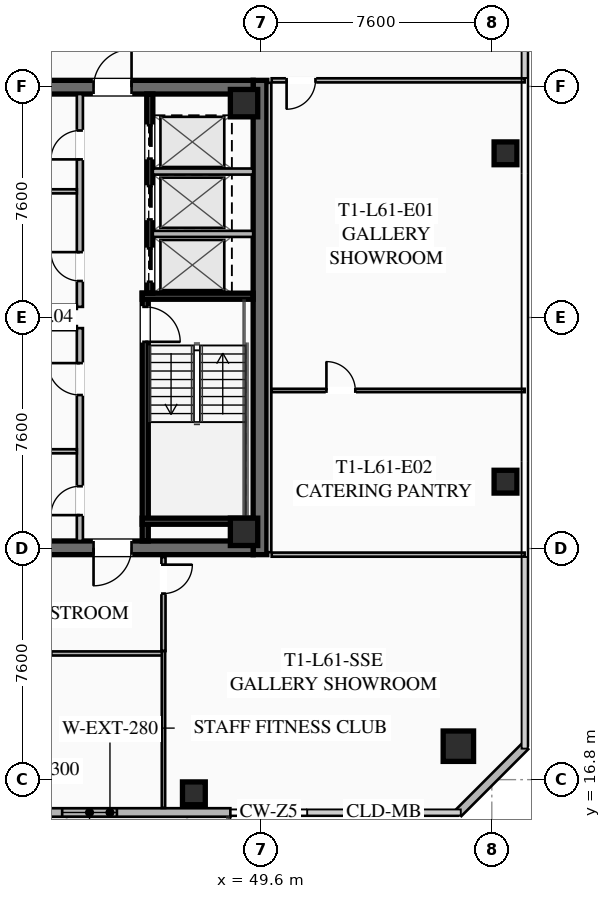
"""IFC4 building model, lengths in metres.
Left out: names, types, materials, properties, quantities, classifications, styles, units other than length and angle.
Written with IfcOpenShell. Run it as: python <this file> out.ifc"""

import sys

from ifc_helpers import new_model, si_unit, direction, frame, frame_2d, origin, origin_2d, place, context, subcontext, project, spatial, rectangle, hollow_rectangle, extrude, element, fill, save


model = new_model("IFC4")
c1 = context("Model", 3, precision=1e-05, world=origin(), true_north=direction((0.0, 1.0)))
c2 = subcontext(c1, "Body", "Model", "MODEL_VIEW")
j1 = project(units=[si_unit("LENGTHUNIT", "METRE"), si_unit("PLANEANGLEUNIT", "RADIAN")], contexts=[c1])
p1 = place(None, origin())
s1 = spatial("IfcSite", under=j1, at=p1, CompositionType="ELEMENT")
p2 = place(p1, origin())
s2 = spatial("IfcBuilding", under=s1, at=p2, CompositionType="ELEMENT")
p3 = place(p2, frame((0.0, 0.0, 225.5)))
s3 = spatial("IfcBuildingStorey", under=s2, at=p3, CompositionType="ELEMENT", Elevation=225.5)
p4 = place(p3, frame((49.575, 39.8, 0.0), z_axis=(0.0, 0.0, 1.0), x_axis=(0.0, -1.0, 0.0)))
e1 = element("IfcWall", 1, at=p4, inside=s3, PredefinedType="SHEAR", context=c2, shape_type="SweptSolid", body=[
    extrude(rectangle(XDim=15.6, YDim=0.45, at=frame_2d((7.8, 0.0))), origin(), (0.0, 0.0, 1.0), 3.55),
])
p5 = place(p3, frame((49.35, 24.425, 0.0), z_axis=(0.0, 0.0, 1.0), x_axis=(-1.0, 0.0, 0.0)))
e2 = element("IfcWall", 2, at=p5, inside=s3, PredefinedType="SHEAR", context=c2, shape_type="SweptSolid", body=[
    extrude(rectangle(XDim=14.7, YDim=0.45, at=frame_2d((7.35, 0.0))), origin(), (0.0, 0.0, 1.0), 3.55),
])
p6 = place(p5, frame((9.05, 0.0, 0.0)))
e3 = element("IfcOpeningElement", 3, at=p6, cuts=e2, PredefinedType="OPENING", context=c2, shape_type="SweptSolid", body=[
    extrude(rectangle(XDim=1.25, YDim=2.25, at=frame_2d((0.625, 1.125))), frame((0.0, 0.235, 0.0), z_axis=(0.0, -1.0, 0.0), x_axis=(1.0, 0.0, 0.0)), (0.0, 0.0, 1.0), 0.47),
])
p7 = place(p5, frame((4.0, 0.0, 0.0)))
e4 = element("IfcOpeningElement", 4, at=p7, cuts=e2, PredefinedType="OPENING", context=c2, shape_type="SweptSolid", body=[
    extrude(rectangle(XDim=1.25, YDim=2.25, at=frame_2d((0.625, 1.125))), frame((0.0, 0.235, 0.0), z_axis=(0.0, -1.0, 0.0), x_axis=(1.0, 0.0, 0.0)), (0.0, 0.0, 1.0), 0.47),
])
p8 = place(p3, frame((34.65, 39.575, 0.0), z_axis=(0.0, 0.0, 1.0), x_axis=(1.0, 0.0, 0.0)))
e5 = element("IfcWall", 5, at=p8, inside=s3, PredefinedType="SHEAR", context=c2, shape_type="SweptSolid", body=[
    extrude(rectangle(XDim=14.7, YDim=0.45, at=frame_2d((7.35, 0.0))), origin(), (0.0, 0.0, 1.0), 3.55),
])
p9 = place(p8, frame((4.4, 0.0, 0.0)))
e6 = element("IfcOpeningElement", 6, at=p9, cuts=e5, PredefinedType="OPENING", context=c2, shape_type="SweptSolid", body=[
    extrude(rectangle(XDim=1.25, YDim=2.25, at=frame_2d((0.625, 1.125))), frame((0.0, 0.235, 0.0), z_axis=(0.0, -1.0, 0.0), x_axis=(1.0, 0.0, 0.0)), (0.0, 0.0, 1.0), 0.47),
])
p10 = place(p8, frame((9.45, 0.0, 0.0)))
e7 = element("IfcOpeningElement", 7, at=p10, cuts=e5, PredefinedType="OPENING", context=c2, shape_type="SweptSolid", body=[
    extrude(rectangle(XDim=1.25, YDim=2.25, at=frame_2d((0.625, 1.125))), frame((0.0, 0.235, 0.0), z_axis=(0.0, -1.0, 0.0), x_axis=(1.0, 0.0, 0.0)), (0.0, 0.0, 1.0), 0.47),
])
for number, where, z_axis, x_axis in (
    (8, (49.05, 24.95, 0.0), (0.0, 0.0, 1.0), (1.0, 0.0, 0.0)),
    (9, (49.05, 39.05, 0.0), (0.0, 0.0, 1.0), (1.0, 0.0, 0.0)),
):
    element("IfcColumn", number, at=place(p3, frame(where, z_axis=z_axis, x_axis=x_axis)), inside=s3, PredefinedType="COLUMN", context=c2, shape_type="SweptSolid", body=[
        extrude(hollow_rectangle(XDim=0.9, YDim=0.9, WallThickness=0.04, at=origin_2d()), origin(), (0.0, 0.0, 1.0), 3.37),
    ])
p11 = place(p3, frame((56.1, 17.9, 0.0), z_axis=(0.0, 0.0, 1.0), x_axis=(1.0, 0.0, 0.0)))
e10 = element("IfcColumn", 10, at=p11, inside=s3, PredefinedType="COLUMN", context=c2, shape_type="SweptSolid", body=[
    extrude(hollow_rectangle(XDim=1.0, YDim=1.0, WallThickness=0.04, at=origin_2d()), origin(), (0.0, 0.0, 1.0), 3.37),
])
for number, where, z_axis, x_axis in (
    (11, (47.4, 16.35, 0.0), (0.0, 0.0, 1.0), (1.0, 0.0, 0.0)),
    (12, (57.65, 26.6, 0.0), (0.0, 0.0, 1.0), (1.0, 0.0, 0.0)),
    (13, (57.65, 37.4, 0.0), (0.0, 0.0, 1.0), (1.0, 0.0, 0.0)),
):
    element("IfcColumn", number, at=place(p3, frame(where, z_axis=z_axis, x_axis=x_axis)), inside=s3, PredefinedType="COLUMN", context=c2, shape_type="SweptSolid", body=[
        extrude(hollow_rectangle(XDim=0.75, YDim=0.75, WallThickness=0.032, at=origin_2d()), origin(), (0.0, 0.0, 1.0), 3.37),
    ])
p12 = place(p3, frame((48.6, 15.72, 0.0), z_axis=(0.0, 0.0, 1.0), x_axis=(-1.0, 0.0, 0.0)))
e14 = element("IfcWall", 14, at=p12, inside=s3, PredefinedType="SOLIDWALL", context=c2, shape_type="SweptSolid", body=[
    extrude(rectangle(XDim=13.2, YDim=0.28, at=frame_2d((6.6, 0.0))), origin(), (0.0, 0.0, 1.0), 3.37),
])
p13 = place(p12, frame((5.95, 0.0, 0.0)))
e15 = element("IfcOpeningElement", 15, at=p13, cuts=e14, PredefinedType="OPENING", context=c2, shape_type="SweptSolid", body=[
    extrude(rectangle(XDim=1.3, YDim=2.15, at=frame_2d((0.65, 1.075))), frame((0.0, 0.15, 0.0), z_axis=(0.0, -1.0, 0.0), x_axis=(1.0, 0.0, 0.0)), (0.0, 0.0, 1.0), 0.3),
])
p14 = place(p12, frame((3.732, 0.0, 0.85)))
e16 = element("IfcOpeningElement", 16, at=p14, cuts=e14, PredefinedType="OPENING", context=c2, shape_type="SweptSolid", body=[
    extrude(rectangle(XDim=1.8, YDim=1.92, at=frame_2d((0.9, 0.96))), frame((0.0, 0.15, 0.0), z_axis=(0.0, -1.0, 0.0), x_axis=(1.0, 0.0, 0.0)), (0.0, 0.0, 1.0), 0.3),
])
p15 = place(p3, frame((58.3, 17.9, 0.0), z_axis=(0.0, 0.0, 1.0), x_axis=(-0.707106781187, -0.707106781187, 0.0)))
e17 = element("IfcWall", 17, at=p15, inside=s3, PredefinedType="SOLIDWALL", context=c2, shape_type="SweptSolid", body=[
    extrude(rectangle(XDim=3.111, YDim=0.28, at=frame_2d((1.556, 0.0))), origin(), (0.0, 0.0, 1.0), 3.37),
])
p16 = place(p3, frame((45.8, 32.8, 0.0), z_axis=(0.0, 0.0, 1.0), x_axis=(0.0, -1.0, 0.0)))
e18 = element("IfcWall", 18, at=p16, inside=s3, PredefinedType="SHEAR", context=c2, shape_type="SweptSolid", body=[
    extrude(rectangle(XDim=8.15, YDim=0.2, at=frame_2d((4.075, 0.0))), origin(), (0.0, 0.0, 1.0), 3.37),
])
p17 = place(p16, frame((0.45, 0.0, 0.0)))
e19 = element("IfcOpeningElement", 19, at=p17, cuts=e18, PredefinedType="OPENING", context=c2, shape_type="SweptSolid", body=[
    extrude(rectangle(XDim=1.15, YDim=2.2, at=frame_2d((0.575, 1.1))), frame((0.0, 0.11, 0.0), z_axis=(0.0, -1.0, 0.0), x_axis=(1.0, 0.0, 0.0)), (0.0, 0.0, 1.0), 0.22),
])
for number, where, z_axis, x_axis in (
    (20, (45.7, 32.7, 0.0), (0.0, 0.0, 1.0), (1.0, 0.0, 0.0)),
    (21, (45.7, 25.3, 0.0), (0.0, 0.0, 1.0), (1.0, 0.0, 0.0)),
):
    element("IfcWall", number, at=place(p3, frame(where, z_axis=z_axis, x_axis=x_axis)), inside=s3, PredefinedType="SHEAR", context=c2, shape_type="SweptSolid", body=[
        extrude(rectangle(XDim=3.65, YDim=0.2, at=frame_2d((1.825, 0.0))), origin(), (0.0, 0.0, 1.0), 3.37),
    ])
p18 = place(p3, frame((45.95, 39.35, 0.0), z_axis=(0.0, 0.0, 1.0), x_axis=(0.0, -1.0, 0.0)))
e22 = element("IfcWall", 22, at=p18, inside=s3, PredefinedType="SHEAR", context=c2, shape_type="SweptSolid", body=[
    extrude(rectangle(XDim=6.55, YDim=0.2, at=frame_2d((3.275, 0.0))), origin(), (0.0, 0.0, 1.0), 3.37),
])
p19 = place(p18, frame((5.075, 0.0, 0.0)))
e23 = element("IfcOpeningElement", 23, at=p19, cuts=e22, PredefinedType="OPENING", context=c2, shape_type="SweptSolid", body=[
    extrude(rectangle(XDim=1.1, YDim=2.2, at=frame_2d((0.55, 1.1))), frame((0.0, 0.11, 0.0), z_axis=(0.0, -1.0, 0.0), x_axis=(1.0, 0.0, 0.0)), (0.0, 0.0, 1.0), 0.22),
])
p20 = place(p18, frame((3.025, 0.0, 0.0)))
e24 = element("IfcOpeningElement", 24, at=p20, cuts=e22, PredefinedType="OPENING", context=c2, shape_type="SweptSolid", body=[
    extrude(rectangle(XDim=1.1, YDim=2.2, at=frame_2d((0.55, 1.1))), frame((0.0, 0.11, 0.0), z_axis=(0.0, -1.0, 0.0), x_axis=(1.0, 0.0, 0.0)), (0.0, 0.0, 1.0), 0.22),
])
p21 = place(p18, frame((1.025, 0.0, 0.0)))
e25 = element("IfcOpeningElement", 25, at=p21, cuts=e22, PredefinedType="OPENING", context=c2, shape_type="SweptSolid", body=[
    extrude(rectangle(XDim=1.1, YDim=2.2, at=frame_2d((0.55, 1.1))), frame((0.0, 0.11, 0.0), z_axis=(0.0, -1.0, 0.0), x_axis=(1.0, 0.0, 0.0)), (0.0, 0.0, 1.0), 0.22),
])
for number, where, z_axis, x_axis in (
    (26, (46.05, 34.75, 0.0), (0.0, 0.0, 1.0), (1.0, 0.0, 0.0)),
    (27, (46.05, 36.8, 0.0), (0.0, 0.0, 1.0), (1.0, 0.0, 0.0)),
):
    element("IfcWall", number, at=place(p3, frame(where, z_axis=z_axis, x_axis=x_axis)), inside=s3, PredefinedType="SOLIDWALL", context=c2, shape_type="SweptSolid", body=[
        extrude(rectangle(XDim=3.3, YDim=0.2, at=frame_2d((1.65, 0.0))), origin(), (0.0, 0.0, 1.0), 3.37),
    ])
p22 = place(p3, frame((43.65, 24.65, 0.0), z_axis=(0.0, 0.0, 1.0), x_axis=(0.0, 1.0, 0.0)))
e28 = element("IfcWall", 28, at=p22, inside=s3, PredefinedType="SOLIDWALL", context=c2, shape_type="SweptSolid", body=[
    extrude(rectangle(XDim=7.0, YDim=0.2, at=frame_2d((3.5, 0.0))), origin(), (0.0, 0.0, 1.0), 2.723),
])
p23 = place(p22, frame((0.85, 0.0, 0.0)))
e29 = element("IfcOpeningElement", 29, at=p23, cuts=e28, PredefinedType="OPENING", context=c2, shape_type="SweptSolid", body=[
    extrude(rectangle(XDim=0.95, YDim=2.05, at=frame_2d((0.475, 1.025))), frame((0.0, 0.11, 0.0), z_axis=(0.0, -1.0, 0.0), x_axis=(1.0, 0.0, 0.0)), (0.0, 0.0, 1.0), 0.22),
])
p24 = place(p22, frame((4.8, 0.0, 0.0)))
e30 = element("IfcOpeningElement", 30, at=p24, cuts=e28, PredefinedType="OPENING", context=c2, shape_type="SweptSolid", body=[
    extrude(rectangle(XDim=1.05, YDim=2.2, at=frame_2d((0.525, 1.1))), frame((0.0, 0.11, 0.0), z_axis=(0.0, -1.0, 0.0), x_axis=(1.0, 0.0, 0.0)), (0.0, 0.0, 1.0), 0.22),
])
for number, where, z_axis, x_axis in (
    (31, (41.67, 31.65, 0.0), (0.0, 0.0, 1.0), (1.0, 0.0, 0.0)),
    (32, (41.67, 27.6, 0.0), (0.0, 0.0, 1.0), (1.0, 0.0, 0.0)),
):
    element("IfcWall", number, at=place(p3, frame(where, z_axis=z_axis, x_axis=x_axis)), inside=s3, PredefinedType="PARTITIONING", context=c2, shape_type="SweptSolid", body=[
        extrude(rectangle(XDim=1.88, YDim=0.135, at=frame_2d((0.94, 0.0))), origin(), (0.0, 0.0, 1.0), 2.723),
    ])
p25 = place(p3, frame((43.65, 32.35, 0.0), z_axis=(0.0, 0.0, 1.0), x_axis=(0.0, 1.0, 0.0)))
e33 = element("IfcWall", 33, at=p25, inside=s3, PredefinedType="SOLIDWALL", context=c2, shape_type="SweptSolid", body=[
    extrude(rectangle(XDim=7.0, YDim=0.2, at=frame_2d((3.5, 0.0))), origin(), (0.0, 0.0, 1.0), 2.723),
])
p26 = place(p25, frame((0.85, 0.0, 0.0)))
e34 = element("IfcOpeningElement", 34, at=p26, cuts=e33, PredefinedType="OPENING", context=c2, shape_type="SweptSolid", body=[
    extrude(rectangle(XDim=0.95, YDim=2.05, at=frame_2d((0.475, 1.025))), frame((0.0, 0.11, 0.0), z_axis=(0.0, -1.0, 0.0), x_axis=(1.0, 0.0, 0.0)), (0.0, 0.0, 1.0), 0.22),
])
p27 = place(p25, frame((4.85, 0.0, 0.0)))
e35 = element("IfcOpeningElement", 35, at=p27, cuts=e33, PredefinedType="OPENING", context=c2, shape_type="SweptSolid", body=[
    extrude(rectangle(XDim=0.95, YDim=2.05, at=frame_2d((0.475, 1.025))), frame((0.0, 0.11, 0.0), z_axis=(0.0, -1.0, 0.0), x_axis=(1.0, 0.0, 0.0)), (0.0, 0.0, 1.0), 0.22),
])
for number, where, z_axis, x_axis in (
    (36, (41.67, 32.35, 0.0), (0.0, 0.0, 1.0), (1.0, 0.0, 0.0)),
    (37, (41.67, 36.15, 0.0), (0.0, 0.0, 1.0), (1.0, 0.0, 0.0)),
):
    element("IfcWall", number, at=place(p3, frame(where, z_axis=z_axis, x_axis=x_axis)), inside=s3, PredefinedType="PARTITIONING", context=c2, shape_type="SweptSolid", body=[
        extrude(rectangle(XDim=1.88, YDim=0.135, at=frame_2d((0.94, 0.0))), origin(), (0.0, 0.0, 1.0), 2.723),
    ])
p28 = place(p3, frame((46.4, 20.95, 0.0), z_axis=(0.0, 0.0, 1.0), x_axis=(-1.0, 0.0, 0.0)))
e38 = element("IfcWall", 38, at=p28, inside=s3, PredefinedType="PARTITIONING", context=c2, shape_type="SweptSolid", body=[
    extrude(rectangle(XDim=18.35, YDim=0.135, at=frame_2d((9.175, 0.0))), origin(), (0.0, 0.0, 1.0), 2.723),
])
p29 = place(p28, frame((17.02, 0.0, 0.0)))
e39 = element("IfcOpeningElement", 39, at=p29, cuts=e38, PredefinedType="OPENING", context=c2, shape_type="SweptSolid", body=[
    extrude(rectangle(XDim=0.95, YDim=2.05, at=frame_2d((0.475, 1.025))), frame((0.0, 0.077, 0.0), z_axis=(0.0, -1.0, 0.0), x_axis=(1.0, 0.0, 0.0)), (0.0, 0.0, 1.0), 0.155),
])
p30 = place(p28, frame((7.708, 0.0, 0.0)))
e40 = element("IfcOpeningElement", 40, at=p30, cuts=e38, PredefinedType="OPENING", context=c2, shape_type="SweptSolid", body=[
    extrude(rectangle(XDim=0.95, YDim=2.05, at=frame_2d((0.475, 1.025))), frame((0.0, 0.077, 0.0), z_axis=(0.0, -1.0, 0.0), x_axis=(1.0, 0.0, 0.0)), (0.0, 0.0, 1.0), 0.155),
])
p31 = place(p28, frame((3.688, 0.0, 0.0)))
e41 = element("IfcOpeningElement", 41, at=p31, cuts=e38, PredefinedType="OPENING", context=c2, shape_type="SweptSolid", body=[
    extrude(rectangle(XDim=0.95, YDim=2.05, at=frame_2d((0.475, 1.025))), frame((0.0, 0.077, 0.0), z_axis=(0.0, -1.0, 0.0), x_axis=(1.0, 0.0, 0.0)), (0.0, 0.0, 1.0), 0.155),
])
p32 = place(p3, frame((46.4, 24.12, 0.0), z_axis=(0.0, 0.0, 1.0), x_axis=(0.0, -1.0, 0.0)))
e42 = element("IfcWall", 42, at=p32, inside=s3, PredefinedType="PARTITIONING", context=c2, shape_type="SweptSolid", body=[
    extrude(rectangle(XDim=3.09, YDim=0.135, at=frame_2d((1.545, 0.0))), origin(), (0.0, 0.0, 1.0), 2.723),
])
p33 = place(p32, frame((0.25, 0.0, 0.0)))
e43 = element("IfcOpeningElement", 43, at=p33, cuts=e42, PredefinedType="OPENING", context=c2, shape_type="SweptSolid", body=[
    extrude(rectangle(XDim=0.95, YDim=2.05, at=frame_2d((0.475, 1.025))), frame((0.0, 0.077, 0.0), z_axis=(0.0, -1.0, 0.0), x_axis=(1.0, 0.0, 0.0)), (0.0, 0.0, 1.0), 0.155),
])
p34 = place(p3, frame((46.4, 15.87, 0.0), z_axis=(0.0, 0.0, 1.0), x_axis=(0.0, 1.0, 0.0)))
e44 = element("IfcWall", 44, at=p34, inside=s3, PredefinedType="PARTITIONING", context=c2, shape_type="SweptSolid", body=[
    extrude(rectangle(XDim=5.16, YDim=0.11, at=frame_2d((2.58, 0.0))), origin(), (0.0, 0.0, 1.0), 2.723),
])
p35 = place(p3, frame((49.88, 39.72, 0.0), z_axis=(0.0, 0.0, 1.0), x_axis=(0.0, -1.0, 0.0)))
e45 = element("IfcWall", 45, at=p35, inside=s3, PredefinedType="PARTITIONING", context=c2, shape_type="SweptSolid", body=[
    extrude(rectangle(XDim=15.44, YDim=0.135, at=frame_2d((7.72, 0.0))), origin(), (0.0, 0.0, 1.0), 2.723),
])
p36 = place(p3, frame((58.28, 39.8, 0.0), z_axis=(0.0, 0.0, 1.0), x_axis=(-1.0, 0.0, 0.0)))
e46 = element("IfcWall", 46, at=p36, inside=s3, PredefinedType="PARTITIONING", context=c2, shape_type="SweptSolid", body=[
    extrude(rectangle(XDim=8.32, YDim=0.135, at=frame_2d((4.16, 0.0))), origin(), (0.0, 0.0, 1.0), 2.723),
])
p37 = place(p36, frame((6.88, 0.0, 0.0)))
e47 = element("IfcOpeningElement", 47, at=p37, cuts=e46, PredefinedType="OPENING", context=c2, shape_type="SweptSolid", body=[
    extrude(rectangle(XDim=0.95, YDim=2.05, at=frame_2d((0.475, 1.025))), frame((0.0, 0.077, 0.0), z_axis=(0.0, -1.0, 0.0), x_axis=(1.0, 0.0, 0.0)), (0.0, 0.0, 1.0), 0.155),
])
p38 = place(p3, frame((49.96, 24.2, 0.0), z_axis=(0.0, 0.0, 1.0), x_axis=(1.0, 0.0, 0.0)))
e48 = element("IfcWall", 48, at=p38, inside=s3, PredefinedType="PARTITIONING", context=c2, shape_type="SweptSolid", body=[
    extrude(rectangle(XDim=8.32, YDim=0.135, at=frame_2d((4.16, 0.0))), origin(), (0.0, 0.0, 1.0), 2.723),
])
p39 = place(p3, frame((49.96, 29.6, 0.0), z_axis=(0.0, 0.0, 1.0), x_axis=(1.0, 0.0, 0.0)))
e49 = element("IfcWall", 49, at=p39, inside=s3, PredefinedType="PARTITIONING", context=c2, shape_type="SweptSolid", body=[
    extrude(rectangle(XDim=8.32, YDim=0.11, at=frame_2d((4.16, 0.0))), origin(), (0.0, 0.0, 1.0), 2.723),
])
p40 = place(p39, frame((1.8, 0.0, 0.0)))
e50 = element("IfcOpeningElement", 50, at=p40, cuts=e49, PredefinedType="OPENING", context=c2, shape_type="SweptSolid", body=[
    extrude(rectangle(XDim=0.95, YDim=2.05, at=frame_2d((0.475, 1.025))), frame((0.0, 0.065, 0.0), z_axis=(0.0, -1.0, 0.0), x_axis=(1.0, 0.0, 0.0)), (0.0, 0.0, 1.0), 0.13),
])
p41 = place(p14, origin())
e51 = element("IfcWindow", 51, at=p41, inside=s3, PartitioningType="SINGLE_PANEL", PredefinedType="WINDOW", context=c2, shape_type="SweptSolid", body=[
    extrude(rectangle(XDim=1.8, YDim=1.92, at=frame_2d((0.9, 0.96))), frame((0.0, 0.03, 0.0), z_axis=(0.0, -1.0, 0.0), x_axis=(1.0, 0.0, 0.0)), (0.0, 0.0, 1.0), 0.06),
])
fill(e16, e51)
p42 = place(p10, origin())
e52 = element("IfcDoor", 52, at=p42, inside=s3, OperationType="SINGLE_SWING_RIGHT", PredefinedType="DOOR", context=c2, shape_type="SweptSolid", body=[
    extrude(rectangle(XDim=1.25, YDim=2.25, at=frame_2d((0.625, 1.125))), frame((0.0, 0.025, 0.0), z_axis=(0.0, -1.0, 0.0), x_axis=(1.0, 0.0, 0.0)), (0.0, 0.0, 1.0), 0.05),
])
fill(e7, e52)
p43 = place(p7, origin())
e53 = element("IfcDoor", 53, at=p43, inside=s3, OperationType="SINGLE_SWING_RIGHT", PredefinedType="DOOR", context=c2, shape_type="SweptSolid", body=[
    extrude(rectangle(XDim=1.25, YDim=2.25, at=frame_2d((0.625, 1.125))), frame((0.0, 0.025, 0.0), z_axis=(0.0, -1.0, 0.0), x_axis=(1.0, 0.0, 0.0)), (0.0, 0.0, 1.0), 0.05),
])
fill(e4, e53)
p44 = place(p17, origin())
e54 = element("IfcDoor", 54, at=p44, inside=s3, OperationType="SINGLE_SWING_RIGHT", PredefinedType="DOOR", context=c2, shape_type="SweptSolid", body=[
    extrude(rectangle(XDim=1.15, YDim=2.2, at=frame_2d((0.575, 1.1))), frame((0.0, 0.025, 0.0), z_axis=(0.0, -1.0, 0.0), x_axis=(1.0, 0.0, 0.0)), (0.0, 0.0, 1.0), 0.05),
])
fill(e19, e54)
p45 = place(p23, origin())
e55 = element("IfcDoor", 55, at=p45, inside=s3, OperationType="SINGLE_SWING_LEFT", PredefinedType="DOOR", context=c2, shape_type="SweptSolid", body=[
    extrude(rectangle(XDim=0.95, YDim=2.05, at=frame_2d((0.475, 1.025))), frame((0.0, 0.025, 0.0), z_axis=(0.0, -1.0, 0.0), x_axis=(1.0, 0.0, 0.0)), (0.0, 0.0, 1.0), 0.05),
])
fill(e29, e55)
p46 = place(p24, origin())
e56 = element("IfcDoor", 56, at=p46, inside=s3, OperationType="SINGLE_SWING_RIGHT", PredefinedType="DOOR", context=c2, shape_type="SweptSolid", body=[
    extrude(rectangle(XDim=1.05, YDim=2.2, at=frame_2d((0.525, 1.1))), frame((0.0, 0.025, 0.0), z_axis=(0.0, -1.0, 0.0), x_axis=(1.0, 0.0, 0.0)), (0.0, 0.0, 1.0), 0.05),
])
fill(e30, e56)
p47 = place(p26, origin())
e57 = element("IfcDoor", 57, at=p47, inside=s3, OperationType="SINGLE_SWING_RIGHT", PredefinedType="DOOR", context=c2, shape_type="SweptSolid", body=[
    extrude(rectangle(XDim=0.95, YDim=2.05, at=frame_2d((0.475, 1.025))), frame((0.0, 0.025, 0.0), z_axis=(0.0, -1.0, 0.0), x_axis=(1.0, 0.0, 0.0)), (0.0, 0.0, 1.0), 0.05),
])
fill(e34, e57)
p48 = place(p27, origin())
e58 = element("IfcDoor", 58, at=p48, inside=s3, OperationType="SINGLE_SWING_LEFT", PredefinedType="DOOR", context=c2, shape_type="SweptSolid", body=[
    extrude(rectangle(XDim=0.95, YDim=2.05, at=frame_2d((0.475, 1.025))), frame((0.0, 0.025, 0.0), z_axis=(0.0, -1.0, 0.0), x_axis=(1.0, 0.0, 0.0)), (0.0, 0.0, 1.0), 0.05),
])
fill(e35, e58)
p49 = place(p33, origin())
e59 = element("IfcDoor", 59, at=p49, inside=s3, OperationType="SINGLE_SWING_LEFT", PredefinedType="DOOR", context=c2, shape_type="SweptSolid", body=[
    extrude(rectangle(XDim=0.95, YDim=2.05, at=frame_2d((0.475, 1.025))), frame((0.0, 0.025, 0.0), z_axis=(0.0, -1.0, 0.0), x_axis=(1.0, 0.0, 0.0)), (0.0, 0.0, 1.0), 0.05),
])
fill(e43, e59)
p50 = place(p37, origin())
e60 = element("IfcDoor", 60, at=p50, inside=s3, OperationType="SINGLE_SWING_RIGHT", PredefinedType="DOOR", context=c2, shape_type="SweptSolid", body=[
    extrude(rectangle(XDim=0.95, YDim=2.05, at=frame_2d((0.475, 1.025))), frame((0.0, 0.025, 0.0), z_axis=(0.0, -1.0, 0.0), x_axis=(1.0, 0.0, 0.0)), (0.0, 0.0, 1.0), 0.05),
])
fill(e47, e60)
p51 = place(p40, origin())
e61 = element("IfcDoor", 61, at=p51, inside=s3, OperationType="SINGLE_SWING_LEFT", PredefinedType="DOOR", context=c2, shape_type="SweptSolid", body=[
    extrude(rectangle(XDim=0.95, YDim=2.05, at=frame_2d((0.475, 1.025))), frame((0.0, 0.025, 0.0), z_axis=(0.0, -1.0, 0.0), x_axis=(1.0, 0.0, 0.0)), (0.0, 0.0, 1.0), 0.05),
])
fill(e50, e61)
p52 = place(p19, origin())
e62 = element("IfcDoor", 62, at=p52, inside=s3, OperationType="SLIDING_TO_LEFT", PredefinedType="DOOR", context=c2, shape_type="SweptSolid", body=[
    extrude(rectangle(XDim=1.1, YDim=2.2, at=frame_2d((0.55, 1.1))), frame((0.0, 0.025, 0.0), z_axis=(0.0, -1.0, 0.0), x_axis=(1.0, 0.0, 0.0)), (0.0, 0.0, 1.0), 0.05),
])
fill(e23, e62)
p53 = place(p20, origin())
e63 = element("IfcDoor", 63, at=p53, inside=s3, OperationType="SLIDING_TO_LEFT", PredefinedType="DOOR", context=c2, shape_type="SweptSolid", body=[
    extrude(rectangle(XDim=1.1, YDim=2.2, at=frame_2d((0.55, 1.1))), frame((0.0, 0.025, 0.0), z_axis=(0.0, -1.0, 0.0), x_axis=(1.0, 0.0, 0.0)), (0.0, 0.0, 1.0), 0.05),
])
fill(e24, e63)
p54 = place(p21, origin())
e64 = element("IfcDoor", 64, at=p54, inside=s3, OperationType="SLIDING_TO_LEFT", PredefinedType="DOOR", context=c2, shape_type="SweptSolid", body=[
    extrude(rectangle(XDim=1.1, YDim=2.2, at=frame_2d((0.55, 1.1))), frame((0.0, 0.025, 0.0), z_axis=(0.0, -1.0, 0.0), x_axis=(1.0, 0.0, 0.0)), (0.0, 0.0, 1.0), 0.05),
])
fill(e25, e64)
save(model, sys.argv[1])
